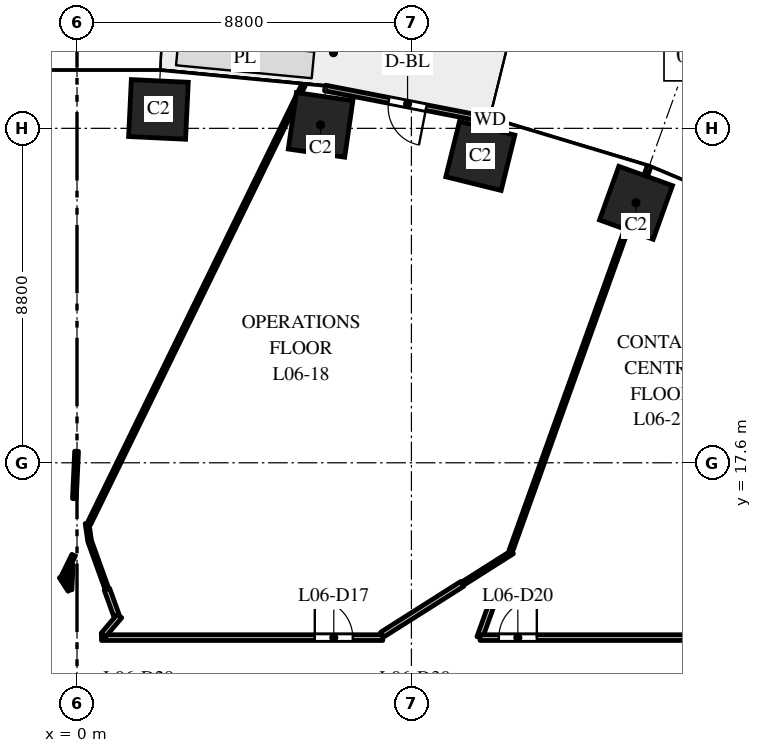
"""IFC4 building model, lengths in metres.
Left out: names, types, materials, properties, quantities, classifications, styles, units other than length and angle.
Written with IfcOpenShell. Run it as: python <this file> out.ifc"""

import sys

from ifc_helpers import new_model, si_unit, direction, frame, frame_2d, origin, origin_2d, place, context, subcontext, project, spatial, rectangle, extrude, element, fill, save


model = new_model("IFC4")
c1 = context("Model", 3, precision=1e-05, world=origin(), true_north=direction((0.0, 1.0)))
c2 = subcontext(c1, "Body", "Model", "MODEL_VIEW")
j1 = project(units=[si_unit("LENGTHUNIT", "METRE"), si_unit("PLANEANGLEUNIT", "RADIAN")], contexts=[c1])
p1 = place(None, origin())
s1 = spatial("IfcSite", under=j1, at=p1, CompositionType="ELEMENT")
p2 = place(p1, origin())
s2 = spatial("IfcBuilding", under=s1, at=p2, CompositionType="ELEMENT")
p3 = place(p2, frame((0.0, 0.0, 34.5)))
s3 = spatial("IfcBuildingStorey", under=s2, at=p3, CompositionType="ELEMENT", Elevation=34.5)
for number, where, z_axis, x_axis in (
    (1, (14.709, 24.441, 0.0), (0.0, 0.0, 1.0), (-0.941, 0.338, 0.0)),
    (2, (10.613, 25.674, 0.0), (0.0, 0.0, 1.0), (-0.971, 0.24, 0.0)),
    (3, (6.409, 26.491, 0.0), (0.0, 0.0, 1.0), (-0.99, 0.143, 0.0)),
    (4, (2.143, 26.898, 0.0), (0.0, 0.0, 1.0), (-0.999, 0.048, 0.0)),
):
    element("IfcColumn", number, at=place(p3, frame(where, z_axis=z_axis, x_axis=x_axis)), inside=s3, PredefinedType="COLUMN", context=c2, shape_type="SweptSolid", body=[
        extrude(rectangle(XDim=1.5, YDim=1.5, at=origin_2d()), origin(), (0.0, 0.0, 1.0), 4.0),
    ])
p4 = place(p3, frame((10.871, 26.617, 0.0), z_axis=(0.0, 0.0, 1.0), x_axis=(-0.981631174778, 0.190788460615, 0.0)))
e5 = element("IfcWall", 5, at=p4, inside=s3, PredefinedType="STANDARD", context=c2, shape_type="SweptSolid", body=[
    extrude(rectangle(XDim=4.426, YDim=0.15, at=frame_2d((2.213, 0.0))), origin(), (0.0, 0.0, 1.0), 3.7),
])
p5 = place(p4, frame((1.713, 0.0, 0.0)))
e6 = element("IfcOpeningElement", 6, at=p5, cuts=e5, PredefinedType="OPENING", context=c2, shape_type="SweptSolid", body=[
    extrude(rectangle(XDim=1.0, YDim=2.4, at=frame_2d((0.5, 1.2))), frame((0.0, 0.085, 0.0), z_axis=(0.0, -1.0, 0.0), x_axis=(1.0, 0.0, 0.0)), (0.0, 0.0, 1.0), 0.17),
])
p6 = place(p3, frame((-0.423, 14.602, 0.0), z_axis=(0.0, 0.0, 1.0), x_axis=(0.543729850084, -0.839260299387, 0.0)))
e7 = element("IfcWall", 7, at=p6, inside=s3, PredefinedType="PARTITIONING", context=c2, shape_type="SweptSolid", body=[
    extrude(rectangle(XDim=0.423, YDim=0.1, at=frame_2d((0.211, 0.0))), origin(), (0.0, 0.0, 1.0), 3.7),
])
p7 = place(p3, frame((-0.365, 14.605, 0.0), z_axis=(0.0, 0.0, 1.0), x_axis=(0.43877676088, 0.898596101767, 0.0)))
e8 = element("IfcWall", 8, at=p7, inside=s3, PredefinedType="PARTITIONING", context=c2, shape_type="SweptSolid", body=[
    extrude(rectangle(XDim=0.626, YDim=0.1, at=frame_2d((0.313, 0.0))), origin(), (0.0, 0.0, 1.0), 3.7),
])
p8 = place(p3, frame((-0.184, 14.26, 0.0), z_axis=(0.0, 0.0, 1.0), x_axis=(0.048551210017, 0.998820694622, 0.0)))
e9 = element("IfcWall", 9, at=p8, inside=s3, PredefinedType="PARTITIONING", context=c2, shape_type="SweptSolid", body=[
    extrude(rectangle(XDim=0.659, YDim=0.1, at=frame_2d((0.329, 0.0))), origin(), (0.0, 0.0, 1.0), 3.7),
])
p9 = place(p3, frame((-0.069, 16.658, 0.0), z_axis=(0.0, 0.0, 1.0), x_axis=(0.046725861685, 0.99890775042, 0.0)))
e10 = element("IfcWall", 10, at=p9, inside=s3, PredefinedType="PARTITIONING", context=c2, shape_type="SweptSolid", body=[
    extrude(rectangle(XDim=0.428, YDim=0.1, at=frame_2d((0.214, 0.0))), origin(), (0.0, 0.0, 1.0), 3.7),
])
p10 = place(p3, frame((-0.048, 17.103, 0.0), z_axis=(0.0, 0.0, 1.0), x_axis=(0.046334071415, 0.998926000175, 0.0)))
e11 = element("IfcWall", 11, at=p10, inside=s3, PredefinedType="PARTITIONING", context=c2, shape_type="SweptSolid", body=[
    extrude(rectangle(XDim=0.801, YDim=0.1, at=frame_2d((0.4, 0.0))), origin(), (0.0, 0.0, 1.0), 3.7),
])
p11 = place(p3, frame((0.265, 16.008, 0.0), z_axis=(0.0, 0.0, 1.0), x_axis=(0.143728876455, -0.989617102759, 0.0)))
e12 = element("IfcWall", 12, at=p11, inside=s3, PredefinedType="PARTITIONING", context=c2, shape_type="SweptSolid", body=[
    extrude(rectangle(XDim=0.474, YDim=0.1, at=frame_2d((0.237, 0.0))), origin(), (0.0, 0.0, 1.0), 3.7),
])
p12 = place(p3, frame((0.317, 16.0, 0.0), z_axis=(0.0, 0.0, 1.0), x_axis=(0.43922717886, 0.898376026701, 0.0)))
e13 = element("IfcWall", 13, at=p12, inside=s3, PredefinedType="PARTITIONING", context=c2, shape_type="SweptSolid", body=[
    extrude(rectangle(XDim=12.843, YDim=0.1, at=frame_2d((6.422, 0.0))), origin(), (0.0, 0.0, 1.0), 2.85),
])
p13 = place(p3, frame((0.34, 15.521, 0.0), z_axis=(0.0, 0.0, 1.0), x_axis=(0.338134523253, -0.941097786728, 0.0)))
e14 = element("IfcWall", 14, at=p13, inside=s3, PredefinedType="PARTITIONING", context=c2, shape_type="SweptSolid", body=[
    extrude(rectangle(XDim=1.315, YDim=0.1, at=frame_2d((0.658, 0.0))), origin(), (0.0, 0.0, 1.0), 3.7),
])
p14 = place(p3, frame((0.643, 13.0, 0.0), z_axis=(0.0, 0.0, 1.0), x_axis=(1.0, 0.0, 0.0)))
e15 = element("IfcWall", 15, at=p14, inside=s3, PredefinedType="PARTITIONING", context=c2, shape_type="SweptSolid", body=[
    extrude(rectangle(XDim=7.404, YDim=0.15, at=frame_2d((3.702, 0.0))), origin(), (0.0, 0.0, 1.0), 2.85),
])
p15 = place(p14, frame((5.614, 0.0, 0.0)))
e16 = element("IfcOpeningElement", 16, at=p15, cuts=e15, PredefinedType="OPENING", context=c2, shape_type="SweptSolid", body=[
    extrude(rectangle(XDim=1.0, YDim=2.1, at=frame_2d((0.5, 1.05))), frame((0.0, 0.085, 0.0), z_axis=(0.0, -1.0, 0.0), x_axis=(1.0, 0.0, 0.0)), (0.0, 0.0, 1.0), 0.17),
])
p16 = place(p3, frame((0.692, 13.065, 0.0), z_axis=(0.0, 0.0, 1.0), x_axis=(0.645925733167, 0.763400253623, 0.0)))
e17 = element("IfcWall", 17, at=p16, inside=s3, PredefinedType="PARTITIONING", context=c2, shape_type="SweptSolid", body=[
    extrude(rectangle(XDim=0.663, YDim=0.15, at=frame_2d((0.332, 0.0))), origin(), (0.0, 0.0, 1.0), 3.7),
])
p17 = place(p3, frame((0.788, 14.273, 0.0), z_axis=(0.0, 0.0, 1.0), x_axis=(0.338541598468, -0.940951426008, 0.0)))
e18 = element("IfcWall", 18, at=p17, inside=s3, PredefinedType="PARTITIONING", context=c2, shape_type="SweptSolid", body=[
    extrude(rectangle(XDim=0.729, YDim=0.15, at=frame_2d((0.365, 0.0))), origin(), (0.0, 0.0, 1.0), 3.7),
])
p18 = place(p3, frame((8.028, 13.077, 0.0), z_axis=(0.0, 0.0, 1.0), x_axis=(0.844718865656, 0.53521027457, 0.0)))
e19 = element("IfcWall", 19, at=p18, inside=s3, PredefinedType="PARTITIONING", context=c2, shape_type="SweptSolid", body=[
    extrude(rectangle(XDim=2.497, YDim=0.15, at=frame_2d((1.248, 0.0))), origin(), (0.0, 0.0, 1.0), 3.7),
])
p19 = place(p3, frame((10.137, 14.413, 0.0), z_axis=(0.0, 0.0, 1.0), x_axis=(0.844849680057, 0.535003755228, 0.0)))
e20 = element("IfcWall", 20, at=p19, inside=s3, PredefinedType="PARTITIONING", context=c2, shape_type="SweptSolid", body=[
    extrude(rectangle(XDim=1.562, YDim=0.1, at=frame_2d((0.781, 0.0))), origin(), (0.0, 0.0, 1.0), 3.7),
])
p20 = place(p3, frame((10.595, 13.0, 0.0), z_axis=(0.0, 0.0, 1.0), x_axis=(0.338659506624, 0.940908995904, 0.0)))
e21 = element("IfcWall", 21, at=p20, inside=s3, PredefinedType="PARTITIONING", context=c2, shape_type="SweptSolid", body=[
    extrude(rectangle(XDim=0.865, YDim=0.15, at=frame_2d((0.433, 0.0))), origin(), (0.0, 0.0, 1.0), 3.7),
])
p21 = place(p3, frame((10.607, 13.0, 0.0), z_axis=(0.0, 0.0, 1.0), x_axis=(1.0, 0.0, 0.0)))
e22 = element("IfcWall", 22, at=p21, inside=s3, PredefinedType="PARTITIONING", context=c2, shape_type="SweptSolid", body=[
    extrude(rectangle(XDim=5.893, YDim=0.15, at=frame_2d((2.947, 0.0))), origin(), (0.0, 0.0, 1.0), 3.7),
])
p22 = place(p21, frame((0.493, 0.0, 0.0)))
e23 = element("IfcOpeningElement", 23, at=p22, cuts=e22, PredefinedType="OPENING", context=c2, shape_type="SweptSolid", body=[
    extrude(rectangle(XDim=1.0, YDim=2.1, at=frame_2d((0.5, 1.05))), frame((0.0, 0.085, 0.0), z_axis=(0.0, -1.0, 0.0), x_axis=(1.0, 0.0, 0.0)), (0.0, 0.0, 1.0), 0.17),
])
p23 = place(p3, frame((11.416, 15.282, 0.0), z_axis=(0.0, 0.0, 1.0), x_axis=(0.338364268616, 0.94101520802, 0.0)))
e24 = element("IfcWall", 24, at=p23, inside=s3, PredefinedType="PARTITIONING", context=c2, shape_type="SweptSolid", body=[
    extrude(rectangle(XDim=10.734, YDim=0.1, at=frame_2d((5.367, 0.0))), origin(), (0.0, 0.0, 1.0), 3.7),
])
p24 = place(p5, origin())
e25 = element("IfcDoor", 25, at=p24, inside=s3, OperationType="SINGLE_SWING_LEFT", PredefinedType="DOOR", context=c2, shape_type="SweptSolid", body=[
    extrude(rectangle(XDim=1.0, YDim=2.4, at=frame_2d((0.5, 1.2))), frame((0.0, 0.025, 0.0), z_axis=(0.0, -1.0, 0.0), x_axis=(1.0, 0.0, 0.0)), (0.0, 0.0, 1.0), 0.05),
])
fill(e6, e25)
p25 = place(p15, origin())
e26 = element("IfcDoor", 26, at=p25, inside=s3, OperationType="SINGLE_SWING_LEFT", PredefinedType="DOOR", context=c2, shape_type="SweptSolid", body=[
    extrude(rectangle(XDim=1.0, YDim=2.1, at=frame_2d((0.5, 1.05))), frame((0.0, 0.025, 0.0), z_axis=(0.0, -1.0, 0.0), x_axis=(1.0, 0.0, 0.0)), (0.0, 0.0, 1.0), 0.05),
])
fill(e16, e26)
p26 = place(p22, origin())
e27 = element("IfcDoor", 27, at=p26, inside=s3, OperationType="SINGLE_SWING_RIGHT", PredefinedType="DOOR", context=c2, shape_type="SweptSolid", body=[
    extrude(rectangle(XDim=1.0, YDim=2.1, at=frame_2d((0.5, 1.05))), frame((0.0, 0.025, 0.0), z_axis=(0.0, -1.0, 0.0), x_axis=(1.0, 0.0, 0.0)), (0.0, 0.0, 1.0), 0.05),
])
fill(e23, e27)
save(model, sys.argv[1])
